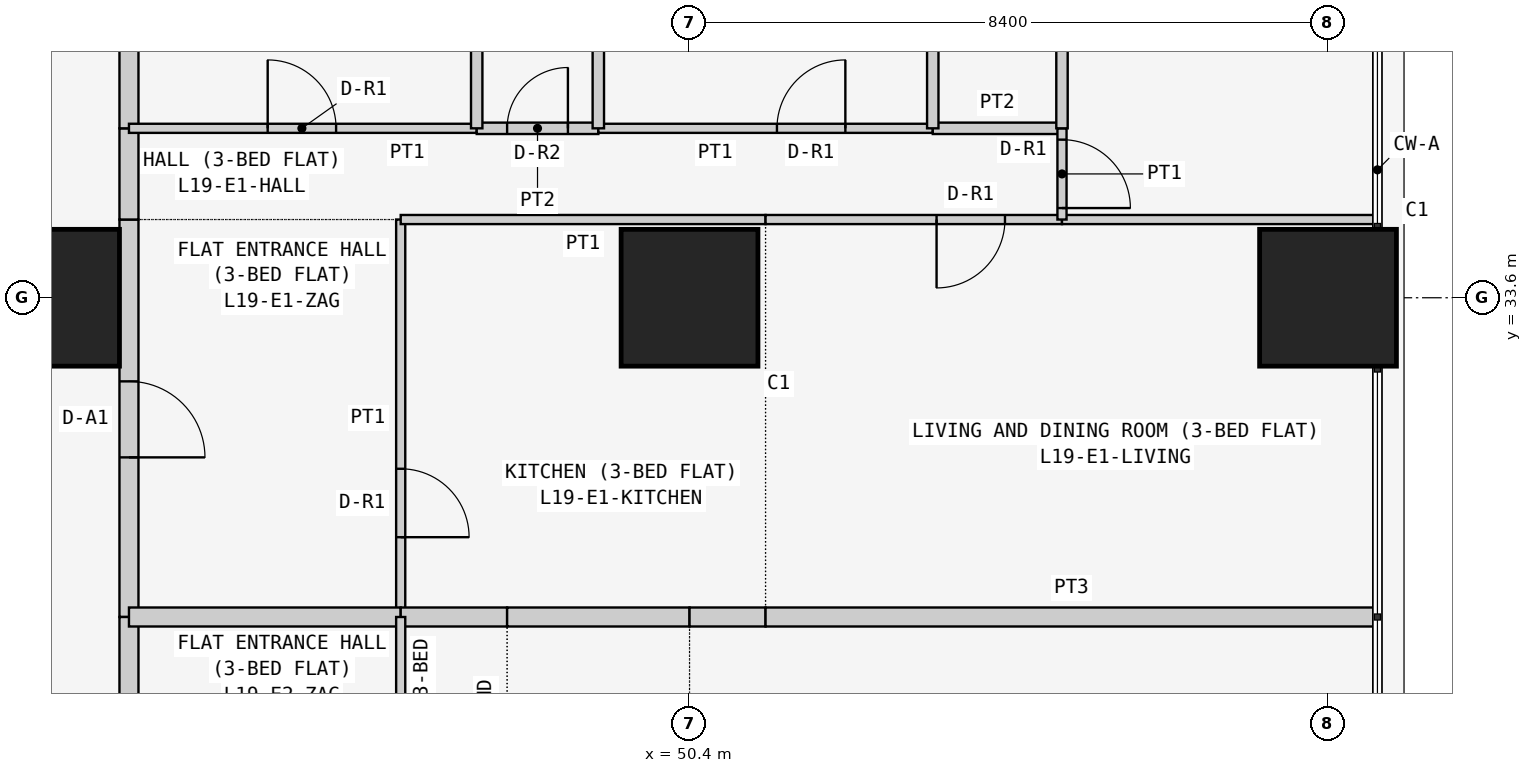
"""IFC4 building model, lengths in metres.
Left out: names, types, materials, properties, quantities, classifications, styles, units other than length and angle.
Written with IfcOpenShell. Run it as: python <this file> out.ifc"""

import sys

from ifc_helpers import new_model, si_unit, direction, frame, frame_2d, origin, origin_2d, place, context, subcontext, project, spatial, rectangle, extrude, element, fill, save


model = new_model("IFC4")
c1 = context("Model", 3, precision=1e-05, world=origin(), true_north=direction((0.0, 1.0)))
c2 = subcontext(c1, "Body", "Model", "MODEL_VIEW")
j1 = project(units=[si_unit("LENGTHUNIT", "METRE"), si_unit("PLANEANGLEUNIT", "RADIAN")], contexts=[c1])
p1 = place(None, origin())
s1 = spatial("IfcSite", under=j1, at=p1, CompositionType="ELEMENT")
p2 = place(p1, origin())
s2 = spatial("IfcBuilding", under=s1, at=p2, CompositionType="ELEMENT")
p3 = place(p2, frame((0.0, 0.0, 77.7)))
s3 = spatial("IfcBuildingStorey", under=s2, at=p3, CompositionType="ELEMENT", Elevation=77.7)
for number, where, z_axis, x_axis in (
    (1, (42.0, 33.6, 0.0), (0.0, 0.0, 1.0), (1.0, 0.0, 0.0)),
    (2, (50.4, 33.6, 0.0), (0.0, 0.0, 1.0), (1.0, 0.0, 0.0)),
    (3, (58.8, 33.6, 0.0), (0.0, 0.0, 1.0), (1.0, 0.0, 0.0)),
):
    element("IfcColumn", number, at=place(p3, frame(where, z_axis=z_axis, x_axis=x_axis)), inside=s3, PredefinedType="COLUMN", context=c2, shape_type="SweptSolid", body=[
        extrude(rectangle(XDim=1.8, YDim=1.8, at=origin_2d()), origin(), (0.0, 0.0, 1.0), 3.6),
    ])
p4 = place(p3, frame((43.025, 34.629, 0.0), z_axis=(0.0, 0.0, 1.0), x_axis=(0.0, -1.0, 0.0)))
e4 = element("IfcWall", 4, at=p4, inside=s3, PredefinedType="PARTITIONING", context=c2, shape_type="SweptSolid", body=[
    extrude(rectangle(XDim=5.229, YDim=0.25, at=frame_2d((2.615, 0.0))), origin(), (0.0, 0.0, 1.0), 3.45),
])
p5 = place(p4, frame((2.129, 0.0, 0.0)))
e5 = element("IfcOpeningElement", 5, at=p5, cuts=e4, PredefinedType="OPENING", context=c2, shape_type="SweptSolid", body=[
    extrude(rectangle(XDim=1.0, YDim=2.1, at=frame_2d((0.5, 1.05))), frame((0.0, 0.135, 0.0), z_axis=(0.0, -1.0, 0.0), x_axis=(1.0, 0.0, 0.0)), (0.0, 0.0, 1.0), 0.27),
])
p6 = place(p3, frame((43.025, 35.829, 0.0), z_axis=(0.0, 0.0, 1.0), x_axis=(0.0, -1.0, 0.0)))
e6 = element("IfcWall", 6, at=p6, inside=s3, PredefinedType="PARTITIONING", context=c2, shape_type="SweptSolid", body=[
    extrude(rectangle(XDim=1.2, YDim=0.25, at=frame_2d((0.6, 0.0))), origin(), (0.0, 0.0, 1.0), 3.45),
])
p7 = place(p3, frame((43.025, 42.7, 0.0), z_axis=(0.0, 0.0, 1.0), x_axis=(0.0, -1.0, 0.0)))
e7 = element("IfcWall", 7, at=p7, inside=s3, PredefinedType="PARTITIONING", context=c2, shape_type="SweptSolid", body=[
    extrude(rectangle(XDim=6.871, YDim=0.25, at=frame_2d((3.436, 0.0))), origin(), (0.0, 0.0, 1.0), 3.45),
])
p8 = place(p3, frame((43.025, 29.4, 0.0), z_axis=(0.0, 0.0, 1.0), x_axis=(0.0, -1.0, 0.0)))
e8 = element("IfcWall", 8, at=p8, inside=s3, PredefinedType="PARTITIONING", context=c2, shape_type="SweptSolid", body=[
    extrude(rectangle(XDim=5.229, YDim=0.25, at=frame_2d((2.615, 0.0))), origin(), (0.0, 0.0, 1.0), 3.45),
])
p9 = place(p8, frame((2.1, 0.0, 0.0)))
e9 = element("IfcOpeningElement", 9, at=p9, cuts=e8, PredefinedType="OPENING", context=c2, shape_type="SweptSolid", body=[
    extrude(rectangle(XDim=1.0, YDim=2.1, at=frame_2d((0.5, 1.05))), frame((0.0, 0.135, 0.0), z_axis=(0.0, -1.0, 0.0), x_axis=(1.0, 0.0, 0.0)), (0.0, 0.0, 1.0), 0.27),
])
p10 = place(p3, frame((46.6, 29.4, 0.0), z_axis=(0.0, 0.0, 1.0), x_axis=(0.0, 1.0, 0.0)))
e10 = element("IfcWall", 10, at=p10, inside=s3, PredefinedType="PARTITIONING", context=c2, shape_type="SweptSolid", body=[
    extrude(rectangle(XDim=5.229, YDim=0.12, at=frame_2d((2.615, 0.0))), origin(), (0.0, 0.0, 1.0), 3.45),
])
p11 = place(p10, frame((1.05, 0.0, 0.0)))
e11 = element("IfcOpeningElement", 11, at=p11, cuts=e10, PredefinedType="OPENING", context=c2, shape_type="SweptSolid", body=[
    extrude(rectangle(XDim=0.9, YDim=2.1, at=frame_2d((0.45, 1.05))), frame((0.0, 0.07, 0.0), z_axis=(0.0, -1.0, 0.0), x_axis=(1.0, 0.0, 0.0)), (0.0, 0.0, 1.0), 0.14),
])
p12 = place(p3, frame((43.025, 29.4, 0.0), z_axis=(0.0, 0.0, 1.0), x_axis=(1.0, 0.0, 0.0)))
e12 = element("IfcWall", 12, at=p12, inside=s3, PredefinedType="PARTITIONING", context=c2, shape_type="SweptSolid", body=[
    extrude(rectangle(XDim=3.575, YDim=0.25, at=frame_2d((1.788, 0.0))), origin(), (0.0, 0.0, 1.0), 3.45),
])
p13 = place(p3, frame((51.4, 34.629, 0.0), z_axis=(0.0, 0.0, 1.0), x_axis=(-1.0, 0.0, 0.0)))
e13 = element("IfcWall", 13, at=p13, inside=s3, PredefinedType="PARTITIONING", context=c2, shape_type="SweptSolid", body=[
    extrude(rectangle(XDim=4.8, YDim=0.12, at=frame_2d((2.4, 0.0))), origin(), (0.0, 0.0, 1.0), 3.45),
])
p14 = place(p3, frame((46.6, 29.4, 0.0), z_axis=(0.0, 0.0, 1.0), x_axis=(1.0, 0.0, 0.0)))
e14 = element("IfcWall", 14, at=p14, inside=s3, PredefinedType="PARTITIONING", context=c2, shape_type="SweptSolid", body=[
    extrude(rectangle(XDim=1.4, YDim=0.25, at=frame_2d((0.7, 0.0))), origin(), (0.0, 0.0, 1.0), 3.45),
])
p15 = place(p3, frame((48.0, 29.4, 0.0), z_axis=(0.0, 0.0, 1.0), x_axis=(1.0, 0.0, 0.0)))
e15 = element("IfcWall", 15, at=p15, inside=s3, PredefinedType="PARTITIONING", context=c2, shape_type="SweptSolid", body=[
    extrude(rectangle(XDim=2.4, YDim=0.25, at=frame_2d((1.2, 0.0))), origin(), (0.0, 0.0, 1.0), 3.45),
])
p16 = place(p3, frame((50.4, 29.4, 0.0), z_axis=(0.0, 0.0, 1.0), x_axis=(1.0, 0.0, 0.0)))
e16 = element("IfcWall", 16, at=p16, inside=s3, PredefinedType="PARTITIONING", context=c2, shape_type="SweptSolid", body=[
    extrude(rectangle(XDim=1.0, YDim=0.25, at=frame_2d((0.5, 0.0))), origin(), (0.0, 0.0, 1.0), 3.45),
])
p17 = place(p3, frame((55.3, 34.629, 0.0), z_axis=(0.0, 0.0, 1.0), x_axis=(-1.0, 0.0, 0.0)))
e17 = element("IfcWall", 17, at=p17, inside=s3, PredefinedType="PARTITIONING", context=c2, shape_type="SweptSolid", body=[
    extrude(rectangle(XDim=3.9, YDim=0.12, at=frame_2d((1.95, 0.0))), origin(), (0.0, 0.0, 1.0), 3.45),
])
p18 = place(p17, frame((0.75, 0.0, 0.0)))
e18 = element("IfcOpeningElement", 18, at=p18, cuts=e17, PredefinedType="OPENING", context=c2, shape_type="SweptSolid", body=[
    extrude(rectangle(XDim=0.9, YDim=2.1, at=frame_2d((0.45, 1.05))), frame((0.0, 0.07, 0.0), z_axis=(0.0, -1.0, 0.0), x_axis=(1.0, 0.0, 0.0)), (0.0, 0.0, 1.0), 0.14),
])
p19 = place(p3, frame((59.45, 34.629, 0.0), z_axis=(0.0, 0.0, 1.0), x_axis=(-1.0, 0.0, 0.0)))
e19 = element("IfcWall", 19, at=p19, inside=s3, PredefinedType="PARTITIONING", context=c2, shape_type="SweptSolid", body=[
    extrude(rectangle(XDim=4.15, YDim=0.12, at=frame_2d((2.075, 0.0))), origin(), (0.0, 0.0, 1.0), 3.45),
])
p20 = place(p3, frame((51.4, 29.4, 0.0), z_axis=(0.0, 0.0, 1.0), x_axis=(1.0, 0.0, 0.0)))
e20 = element("IfcWall", 20, at=p20, inside=s3, PredefinedType="PARTITIONING", context=c2, shape_type="SweptSolid", body=[
    extrude(rectangle(XDim=8.05, YDim=0.25, at=frame_2d((4.025, 0.0))), origin(), (0.0, 0.0, 1.0), 3.45),
])
p21 = place(p3, frame((47.6, 35.829, 0.0), z_axis=(0.0, 0.0, 1.0), x_axis=(-1.0, 0.0, 0.0)))
e21 = element("IfcWall", 21, at=p21, inside=s3, PredefinedType="PARTITIONING", context=c2, shape_type="SweptSolid", body=[
    extrude(rectangle(XDim=4.575, YDim=0.12, at=frame_2d((2.288, 0.0))), origin(), (0.0, 0.0, 1.0), 3.45),
])
p22 = place(p21, frame((1.85, 0.0, 0.0)))
e22 = element("IfcOpeningElement", 22, at=p22, cuts=e21, PredefinedType="OPENING", context=c2, shape_type="SweptSolid", body=[
    extrude(rectangle(XDim=0.9, YDim=2.1, at=frame_2d((0.45, 1.05))), frame((0.0, 0.07, 0.0), z_axis=(0.0, -1.0, 0.0), x_axis=(1.0, 0.0, 0.0)), (0.0, 0.0, 1.0), 0.14),
])
p23 = place(p3, frame((49.2, 35.829, 0.0), z_axis=(0.0, 0.0, 1.0), x_axis=(-1.0, 0.0, 0.0)))
e23 = element("IfcWall", 23, at=p23, inside=s3, PredefinedType="PARTITIONING", context=c2, shape_type="SweptSolid", body=[
    extrude(rectangle(XDim=1.6, YDim=0.15, at=frame_2d((0.8, 0.0))), origin(), (0.0, 0.0, 1.0), 3.45),
])
p24 = place(p23, frame((0.4, 0.0, 0.0)))
e24 = element("IfcOpeningElement", 24, at=p24, cuts=e23, PredefinedType="OPENING", context=c2, shape_type="SweptSolid", body=[
    extrude(rectangle(XDim=0.8, YDim=2.1, at=frame_2d((0.4, 1.05))), frame((0.0, 0.085, 0.0), z_axis=(0.0, -1.0, 0.0), x_axis=(1.0, 0.0, 0.0)), (0.0, 0.0, 1.0), 0.17),
])
p25 = place(p3, frame((53.6, 35.829, 0.0), z_axis=(0.0, 0.0, 1.0), x_axis=(-1.0, 0.0, 0.0)))
e25 = element("IfcWall", 25, at=p25, inside=s3, PredefinedType="PARTITIONING", context=c2, shape_type="SweptSolid", body=[
    extrude(rectangle(XDim=4.4, YDim=0.12, at=frame_2d((2.2, 0.0))), origin(), (0.0, 0.0, 1.0), 3.45),
])
p26 = place(p25, frame((1.15, 0.0, 0.0)))
e26 = element("IfcOpeningElement", 26, at=p26, cuts=e25, PredefinedType="OPENING", context=c2, shape_type="SweptSolid", body=[
    extrude(rectangle(XDim=0.9, YDim=2.1, at=frame_2d((0.45, 1.05))), frame((0.0, 0.07, 0.0), z_axis=(0.0, -1.0, 0.0), x_axis=(1.0, 0.0, 0.0)), (0.0, 0.0, 1.0), 0.14),
])
p27 = place(p3, frame((55.3, 35.829, 0.0), z_axis=(0.0, 0.0, 1.0), x_axis=(-1.0, 0.0, 0.0)))
e27 = element("IfcWall", 27, at=p27, inside=s3, PredefinedType="PARTITIONING", context=c2, shape_type="SweptSolid", body=[
    extrude(rectangle(XDim=1.7, YDim=0.15, at=frame_2d((0.85, 0.0))), origin(), (0.0, 0.0, 1.0), 3.45),
])
p28 = place(p3, frame((55.3, 34.629, 0.0), z_axis=(0.0, 0.0, 1.0), x_axis=(0.0, 1.0, 0.0)))
e28 = element("IfcWall", 28, at=p28, inside=s3, PredefinedType="PARTITIONING", context=c2, shape_type="SweptSolid", body=[
    extrude(rectangle(XDim=1.2, YDim=0.12, at=frame_2d((0.6, 0.0))), origin(), (0.0, 0.0, 1.0), 3.45),
])
p29 = place(p28, frame((0.151, 0.0, 0.0)))
e29 = element("IfcOpeningElement", 29, at=p29, cuts=e28, PredefinedType="OPENING", context=c2, shape_type="SweptSolid", body=[
    extrude(rectangle(XDim=0.9, YDim=2.1, at=frame_2d((0.45, 1.05))), frame((0.0, 0.07, 0.0), z_axis=(0.0, -1.0, 0.0), x_axis=(1.0, 0.0, 0.0)), (0.0, 0.0, 1.0), 0.14),
])
for number, where, z_axis, x_axis in (
    (30, (47.6, 35.829, 0.0), (0.0, 0.0, 1.0), (0.0, 1.0, 0.0)),
    (31, (49.2, 35.829, 0.0), (0.0, 0.0, 1.0), (0.0, 1.0, 0.0)),
    (32, (53.6, 35.829, 0.0), (0.0, 0.0, 1.0), (0.0, 1.0, 0.0)),
):
    element("IfcWall", number, at=place(p3, frame(where, z_axis=z_axis, x_axis=x_axis)), inside=s3, PredefinedType="PARTITIONING", context=c2, shape_type="SweptSolid", body=[
        extrude(rectangle(XDim=6.871, YDim=0.15, at=frame_2d((3.436, 0.0))), origin(), (0.0, 0.0, 1.0), 3.45),
    ])
p30 = place(p3, frame((55.3, 35.829, 0.0), z_axis=(0.0, 0.0, 1.0), x_axis=(0.0, 1.0, 0.0)))
e33 = element("IfcWall", 33, at=p30, inside=s3, PredefinedType="PARTITIONING", context=c2, shape_type="SweptSolid", body=[
    extrude(rectangle(XDim=6.871, YDim=0.15, at=frame_2d((3.436, 0.0))), origin(), (0.0, 0.0, 1.0), 3.45),
])
p31 = place(p30, frame((3.171, 0.0, 0.0)))
e34 = element("IfcOpeningElement", 34, at=p31, cuts=e33, PredefinedType="OPENING", context=c2, shape_type="SweptSolid", body=[
    extrude(rectangle(XDim=0.8, YDim=2.1, at=frame_2d((0.4, 1.05))), frame((0.0, 0.085, 0.0), z_axis=(0.0, -1.0, 0.0), x_axis=(1.0, 0.0, 0.0)), (0.0, 0.0, 1.0), 0.17),
])
p32 = place(p3, frame((46.6, 29.4, 0.0), z_axis=(0.0, 0.0, 1.0), x_axis=(0.0, -1.0, 0.0)))
e35 = element("IfcWall", 35, at=p32, inside=s3, PredefinedType="PARTITIONING", context=c2, shape_type="SweptSolid", body=[
    extrude(rectangle(XDim=5.229, YDim=0.12, at=frame_2d((2.615, 0.0))), origin(), (0.0, 0.0, 1.0), 3.45),
])
p33 = place(p5, origin())
e36 = element("IfcDoor", 36, at=p33, inside=s3, OperationType="SINGLE_SWING_RIGHT", PredefinedType="DOOR", context=c2, shape_type="SweptSolid", body=[
    extrude(rectangle(XDim=1.0, YDim=2.1, at=frame_2d((0.5, 1.05))), frame((0.0, 0.025, 0.0), z_axis=(0.0, -1.0, 0.0), x_axis=(1.0, 0.0, 0.0)), (0.0, 0.0, 1.0), 0.05),
])
fill(e5, e36)
p34 = place(p11, frame((0.9, 0.0, 0.0), z_axis=(0.0, 0.0, 1.0), x_axis=(-1.0, 0.0, 0.0)))
e37 = element("IfcDoor", 37, at=p34, inside=s3, OperationType="SINGLE_SWING_RIGHT", PredefinedType="DOOR", context=c2, shape_type="SweptSolid", body=[
    extrude(rectangle(XDim=0.9, YDim=2.1, at=frame_2d((0.45, 1.05))), frame((0.0, 0.025, 0.0), z_axis=(0.0, -1.0, 0.0), x_axis=(1.0, 0.0, 0.0)), (0.0, 0.0, 1.0), 0.05),
])
fill(e11, e37)
p35 = place(p18, origin())
e38 = element("IfcDoor", 38, at=p35, inside=s3, OperationType="SINGLE_SWING_RIGHT", PredefinedType="DOOR", context=c2, shape_type="SweptSolid", body=[
    extrude(rectangle(XDim=0.9, YDim=2.1, at=frame_2d((0.45, 1.05))), frame((0.0, 0.025, 0.0), z_axis=(0.0, -1.0, 0.0), x_axis=(1.0, 0.0, 0.0)), (0.0, 0.0, 1.0), 0.05),
])
fill(e18, e38)
p36 = place(p22, frame((0.9, 0.0, 0.0), z_axis=(0.0, 0.0, 1.0), x_axis=(-1.0, 0.0, 0.0)))
e39 = element("IfcDoor", 39, at=p36, inside=s3, OperationType="SINGLE_SWING_LEFT", PredefinedType="DOOR", context=c2, shape_type="SweptSolid", body=[
    extrude(rectangle(XDim=0.9, YDim=2.1, at=frame_2d((0.45, 1.05))), frame((0.0, 0.025, 0.0), z_axis=(0.0, -1.0, 0.0), x_axis=(1.0, 0.0, 0.0)), (0.0, 0.0, 1.0), 0.05),
])
fill(e22, e39)
p37 = place(p24, frame((0.8, 0.0, 0.0), z_axis=(0.0, 0.0, 1.0), x_axis=(-1.0, 0.0, 0.0)))
e40 = element("IfcDoor", 40, at=p37, inside=s3, OperationType="SINGLE_SWING_RIGHT", PredefinedType="DOOR", context=c2, shape_type="SweptSolid", body=[
    extrude(rectangle(XDim=0.8, YDim=2.1, at=frame_2d((0.4, 1.05))), frame((0.0, 0.025, 0.0), z_axis=(0.0, -1.0, 0.0), x_axis=(1.0, 0.0, 0.0)), (0.0, 0.0, 1.0), 0.05),
])
fill(e24, e40)
p38 = place(p26, frame((0.9, 0.0, 0.0), z_axis=(0.0, 0.0, 1.0), x_axis=(-1.0, 0.0, 0.0)))
e41 = element("IfcDoor", 41, at=p38, inside=s3, OperationType="SINGLE_SWING_RIGHT", PredefinedType="DOOR", context=c2, shape_type="SweptSolid", body=[
    extrude(rectangle(XDim=0.9, YDim=2.1, at=frame_2d((0.45, 1.05))), frame((0.0, 0.025, 0.0), z_axis=(0.0, -1.0, 0.0), x_axis=(1.0, 0.0, 0.0)), (0.0, 0.0, 1.0), 0.05),
])
fill(e26, e41)
p39 = place(p29, frame((0.9, 0.0, 0.0), z_axis=(0.0, 0.0, 1.0), x_axis=(-1.0, 0.0, 0.0)))
e42 = element("IfcDoor", 42, at=p39, inside=s3, OperationType="SINGLE_SWING_RIGHT", PredefinedType="DOOR", context=c2, shape_type="SweptSolid", body=[
    extrude(rectangle(XDim=0.9, YDim=2.1, at=frame_2d((0.45, 1.05))), frame((0.0, 0.025, 0.0), z_axis=(0.0, -1.0, 0.0), x_axis=(1.0, 0.0, 0.0)), (0.0, 0.0, 1.0), 0.05),
])
fill(e29, e42)
save(model, sys.argv[1])
